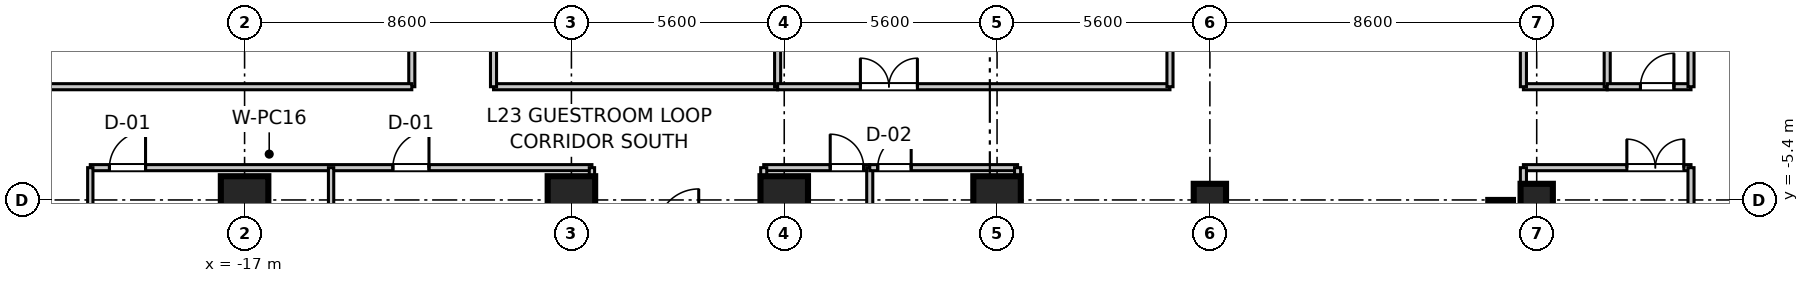
"""IFC4 building model, lengths in metres.
Left out: names, types, materials, properties, quantities, classifications, styles, units other than length and angle.
Written with IfcOpenShell. Run it as: python <this file> out.ifc"""

import sys

from ifc_helpers import new_model, si_unit, direction, frame, frame_2d, origin, origin_2d, place, context, subcontext, project, spatial, rectangle, extrude, source, transform, mapped, element, fill, save


model = new_model("IFC4")
c1 = context("Model", 3, precision=1e-05, world=origin(), true_north=direction((0.0, 1.0)))
c2 = subcontext(c1, "Body", "Model", "MODEL_VIEW")
j1 = project(units=[si_unit("LENGTHUNIT", "METRE"), si_unit("PLANEANGLEUNIT", "RADIAN")], contexts=[c1])
p1 = place(None, origin())
s1 = spatial("IfcSite", under=j1, at=p1, CompositionType="ELEMENT")
p2 = place(p1, origin())
s2 = spatial("IfcBuilding", under=s1, at=p2, CompositionType="ELEMENT")
p3 = place(p2, frame((0.0, 0.0, 95.6)))
s3 = spatial("IfcBuildingStorey", under=s2, at=p3, CompositionType="ELEMENT", Elevation=95.6)
m1 = source(origin(), c2, "Body", "SweptSolid", [
    extrude(rectangle(XDim=1.25, YDim=1.25, at=origin_2d()), origin(), (0.0, 0.0, 1.0), 3.605),
])
for number, where, z_axis, x_axis in (
    (1, (-17.0, -5.4, 0.0), (0.0, 0.0, 1.0), (1.0, 0.0, 0.0)),
    (2, (-8.4, -5.4, 0.0), (0.0, 0.0, 1.0), (1.0, 0.0, 0.0)),
    (3, (-2.8, -5.4, 0.0), (0.0, 0.0, 1.0), (1.0, 0.0, 0.0)),
    (4, (2.8, -5.4, 0.0), (0.0, 0.0, 1.0), (1.0, 0.0, 0.0)),
):
    element("IfcColumn", number, at=place(p3, frame(where, z_axis=z_axis, x_axis=x_axis)), inside=s3, PredefinedType="COLUMN", context=c2, shape_type="MappedRepresentation", body=[
        mapped(m1, transform((0.0, 0.0, 0.0), scale=1.0)),
    ])
m2 = source(origin(), c2, "Body", "SweptSolid", [
    extrude(rectangle(XDim=0.85, YDim=0.85, at=origin_2d()), origin(), (0.0, 0.0, 1.0), 3.605),
])
for number, where, z_axis, x_axis in (
    (5, (8.4, -5.4, 0.0), (0.0, 0.0, 1.0), (1.0, 0.0, 0.0)),
    (6, (17.0, -5.4, 0.0), (0.0, 0.0, 1.0), (1.0, 0.0, 0.0)),
):
    element("IfcColumn", number, at=place(p3, frame(where, z_axis=z_axis, x_axis=x_axis)), inside=s3, PredefinedType="PILASTER", context=c2, shape_type="MappedRepresentation", body=[
        mapped(m2, transform((0.0, 0.0, 0.0), scale=1.0)),
    ])
m3 = source(origin(), c2, "Body", "SweptSolid", [
    extrude(rectangle(XDim=11.6, YDim=0.65, at=frame_2d((5.8, 0.0))), origin(), (0.0, 0.0, 1.0), 3.38),
])
p4 = place(p3, frame((16.05, -17.0, 0.0), z_axis=(0.0, 0.0, 1.0), x_axis=(0.0, 1.0, 0.0)))
e7 = element("IfcWall", 7, at=p4, inside=s3, PredefinedType="SHEAR", context=c2, shape_type="MappedRepresentation", body=[
    mapped(m3, transform((0.0, 0.0, 0.0), scale=1.0)),
])
m4 = source(origin(), c2, "Body", "SweptSolid", [
    extrude(rectangle(XDim=4.41, YDim=0.16, at=frame_2d((2.205, 0.0))), origin(), (0.0, 0.0, 1.0), 2.72),
])
p5 = place(p3, frame((16.65, -4.55, 0.0), z_axis=(0.0, 0.0, 1.0), x_axis=(1.0, 0.0, 0.0)))
e8 = element("IfcWall", 8, at=p5, inside=s3, PredefinedType="PARTITIONING", context=c2, shape_type="MappedRepresentation", body=[
    mapped(m4, transform((0.0, 0.0, 0.0), scale=1.0)),
])
p6 = place(p5, frame((2.722, 0.0, 0.0)))
e9 = element("IfcOpeningElement", 9, at=p6, cuts=e8, PredefinedType="OPENING", context=c2, shape_type="SweptSolid", body=[
    extrude(rectangle(XDim=1.5, YDim=2.15, at=frame_2d((0.75, 1.075))), frame((0.0, 0.09, 0.0), z_axis=(0.0, -1.0, 0.0), x_axis=(1.0, 0.0, 0.0)), (0.0, 0.0, 1.0), 0.18),
])
m5 = source(origin(), c2, "Body", "SweptSolid", [
    extrude(rectangle(XDim=19.25, YDim=0.16, at=frame_2d((9.625, 0.0))), origin(), (0.0, 0.0, 1.0), 2.72),
])
p7 = place(p3, frame((16.65, -23.8, 0.0), z_axis=(0.0, 0.0, 1.0), x_axis=(0.0, 1.0, 0.0)))
e10 = element("IfcWall", 10, at=p7, inside=s3, PredefinedType="PARTITIONING", context=c2, shape_type="MappedRepresentation", body=[
    mapped(m5, transform((0.0, 0.0, 0.0), scale=1.0)),
])
m6 = source(origin(), c2, "Body", "SweptSolid", [
    extrude(rectangle(XDim=17.83, YDim=0.16, at=frame_2d((8.915, 0.0))), origin(), (0.0, 0.0, 1.0), 2.72),
])
p8 = place(p3, frame((21.06, -22.38, 0.0), z_axis=(0.0, 0.0, 1.0), x_axis=(0.0, 1.0, 0.0)))
e11 = element("IfcWall", 11, at=p8, inside=s3, PredefinedType="PARTITIONING", context=c2, shape_type="MappedRepresentation", body=[
    mapped(m6, transform((0.0, 0.0, 0.0), scale=1.0)),
])
m7 = source(origin(), c2, "Body", "SweptSolid", [
    extrude(rectangle(XDim=13.2, YDim=0.16, at=frame_2d((6.6, 0.0))), origin(), (0.0, 0.0, 1.0), 2.72),
])
p9 = place(p3, frame((-21.06, -4.55, 0.0), z_axis=(0.0, 0.0, 1.0), x_axis=(1.0, 0.0, 0.0)))
e12 = element("IfcWall", 12, at=p9, inside=s3, PredefinedType="PARTITIONING", context=c2, shape_type="MappedRepresentation", body=[
    mapped(m7, transform((0.0, 0.0, 0.0), scale=1.0)),
])
p10 = place(p9, frame((0.504, 0.0, 0.0)))
e13 = element("IfcOpeningElement", 13, at=p10, cuts=e12, PredefinedType="OPENING", context=c2, shape_type="SweptSolid", body=[
    extrude(rectangle(XDim=0.95, YDim=2.1, at=frame_2d((0.475, 1.05))), frame((0.0, 0.09, 0.0), z_axis=(0.0, -1.0, 0.0), x_axis=(1.0, 0.0, 0.0)), (0.0, 0.0, 1.0), 0.18),
])
p11 = place(p9, frame((7.962, 0.0, 0.0)))
e14 = element("IfcOpeningElement", 14, at=p11, cuts=e12, PredefinedType="OPENING", context=c2, shape_type="SweptSolid", body=[
    extrude(rectangle(XDim=0.95, YDim=2.1, at=frame_2d((0.475, 1.05))), frame((0.0, 0.09, 0.0), z_axis=(0.0, -1.0, 0.0), x_axis=(1.0, 0.0, 0.0)), (0.0, 0.0, 1.0), 0.18),
])
m8 = source(origin(), c2, "Body", "SweptSolid", [
    extrude(rectangle(XDim=17.83, YDim=0.14, at=frame_2d((8.915, 0.0))), origin(), (0.0, 0.0, 1.0), 2.72),
])
p12 = place(p3, frame((-21.06, -22.38, 0.0), z_axis=(0.0, 0.0, 1.0), x_axis=(0.0, 1.0, 0.0)))
e15 = element("IfcWall", 15, at=p12, inside=s3, PredefinedType="PARTITIONING", context=c2, shape_type="MappedRepresentation", body=[
    mapped(m8, transform((0.0, 0.0, 0.0), scale=1.0)),
])
m9 = source(origin(), c2, "Body", "SweptSolid", [
    extrude(rectangle(XDim=19.25, YDim=0.14, at=frame_2d((9.625, 0.0))), origin(), (0.0, 0.0, 1.0), 2.72),
])
for number, where, z_axis, x_axis in (
    (16, (-7.86, -23.8, 0.0), (0.0, 0.0, 1.0), (0.0, 1.0, 0.0)),
    (17, (-14.724, -23.8, 0.0), (0.0, 0.0, 1.0), (0.0, 1.0, 0.0)),
):
    element("IfcWall", number, at=place(p3, frame(where, z_axis=z_axis, x_axis=x_axis)), inside=s3, PredefinedType="PARTITIONING", context=c2, shape_type="MappedRepresentation", body=[
        mapped(m9, transform((0.0, 0.0, 0.0), scale=1.0)),
    ])
m10 = source(origin(), c2, "Body", "SweptSolid", [
    extrude(rectangle(XDim=2.79, YDim=0.16, at=frame_2d((1.395, 0.0))), origin(), (0.0, 0.0, 1.0), 2.72),
])
p13 = place(p3, frame((-3.34, -4.55, 0.0), z_axis=(0.0, 0.0, 1.0), x_axis=(1.0, 0.0, 0.0)))
e18 = element("IfcWall", 18, at=p13, inside=s3, PredefinedType="PARTITIONING", context=c2, shape_type="MappedRepresentation", body=[
    mapped(m10, transform((0.0, 0.0, 0.0), scale=1.0)),
])
p14 = place(p13, frame((1.75, 0.0, 0.0)))
e19 = element("IfcOpeningElement", 19, at=p14, cuts=e18, PredefinedType="OPENING", context=c2, shape_type="SweptSolid", body=[
    extrude(rectangle(XDim=0.88, YDim=2.1, at=frame_2d((0.44, 1.05))), frame((0.0, 0.09, 0.0), z_axis=(0.0, -1.0, 0.0), x_axis=(1.0, 0.0, 0.0)), (0.0, 0.0, 1.0), 0.18),
])
for number, where, z_axis, x_axis in (
    (20, (-3.34, -23.8, 0.0), (0.0, 0.0, 1.0), (0.0, 1.0, 0.0)),
    (21, (-0.55, -23.8, 0.0), (0.0, 0.0, 1.0), (0.0, 1.0, 0.0)),
):
    element("IfcWall", number, at=place(p3, frame(where, z_axis=z_axis, x_axis=x_axis)), inside=s3, PredefinedType="PARTITIONING", context=c2, shape_type="MappedRepresentation", body=[
        mapped(m5, transform((0.0, 0.0, 0.0), scale=1.0)),
    ])
m11 = source(origin(), c2, "Body", "SweptSolid", [
    extrude(rectangle(XDim=3.89, YDim=0.16, at=frame_2d((1.945, 0.0))), origin(), (0.0, 0.0, 1.0), 2.72),
])
p15 = place(p3, frame((-0.55, -4.55, 0.0), z_axis=(0.0, 0.0, 1.0), x_axis=(1.0, 0.0, 0.0)))
e22 = element("IfcWall", 22, at=p15, inside=s3, PredefinedType="PARTITIONING", context=c2, shape_type="MappedRepresentation", body=[
    mapped(m11, transform((0.0, 0.0, 0.0), scale=1.0)),
])
p16 = place(p15, frame((0.21, 0.0, 0.0)))
e23 = element("IfcOpeningElement", 23, at=p16, cuts=e22, PredefinedType="OPENING", context=c2, shape_type="SweptSolid", body=[
    extrude(rectangle(XDim=0.88, YDim=2.1, at=frame_2d((0.44, 1.05))), frame((0.0, 0.09, 0.0), z_axis=(0.0, -1.0, 0.0), x_axis=(1.0, 0.0, 0.0)), (0.0, 0.0, 1.0), 0.18),
])
p17 = place(p3, frame((3.34, -23.8, 0.0), z_axis=(0.0, 0.0, 1.0), x_axis=(0.0, 1.0, 0.0)))
e24 = element("IfcWall", 24, at=p17, inside=s3, PredefinedType="PARTITIONING", context=c2, shape_type="MappedRepresentation", body=[
    mapped(m5, transform((0.0, 0.0, 0.0), scale=1.0)),
])
m12 = source(origin(), c2, "Body", "SweptSolid", [
    extrude(rectangle(XDim=4.84, YDim=0.16, at=frame_2d((2.42, 0.0))), origin(), (0.0, 0.0, 1.0), 2.72),
])
p18 = place(p3, frame((-12.6, -2.42, 0.0), z_axis=(0.0, 0.0, 1.0), x_axis=(0.0, 1.0, 0.0)))
e25 = element("IfcWall", 25, at=p18, inside=s3, PredefinedType="PARTITIONING", context=c2, shape_type="MappedRepresentation", body=[
    mapped(m12, transform((0.0, 0.0, 0.0), scale=1.0)),
])
m13 = source(origin(), c2, "Body", "SweptSolid", [
    extrude(rectangle(XDim=11.2, YDim=0.16, at=frame_2d((5.6, 0.0))), origin(), (0.0, 0.0, 1.0), 2.72),
])
p19 = place(p3, frame((-23.8, -2.42, 0.0), z_axis=(0.0, 0.0, 1.0), x_axis=(1.0, 0.0, 0.0)))
e26 = element("IfcWall", 26, at=p19, inside=s3, PredefinedType="PARTITIONING", context=c2, shape_type="MappedRepresentation", body=[
    mapped(m13, transform((0.0, 0.0, 0.0), scale=1.0)),
])
m14 = source(origin(), c2, "Body", "SweptSolid", [
    extrude(rectangle(XDim=7.476, YDim=0.16, at=frame_2d((3.738, 0.0))), origin(), (0.0, 0.0, 1.0), 2.72),
])
p20 = place(p3, frame((-10.45, -2.42, 0.0), z_axis=(0.0, 0.0, 1.0), x_axis=(1.0, 0.0, 0.0)))
e27 = element("IfcWall", 27, at=p20, inside=s3, PredefinedType="PARTITIONING", context=c2, shape_type="MappedRepresentation", body=[
    mapped(m14, transform((0.0, 0.0, 0.0), scale=1.0)),
])
for number, where, z_axis, x_axis in (
    (28, (-10.45, -2.42, 0.0), (0.0, 0.0, 1.0), (0.0, 1.0, 0.0)),
    (29, (-2.974, -2.42, 0.0), (0.0, 0.0, 1.0), (0.0, 1.0, 0.0)),
):
    element("IfcWall", number, at=place(p3, frame(where, z_axis=z_axis, x_axis=x_axis)), inside=s3, PredefinedType="PARTITIONING", context=c2, shape_type="MappedRepresentation", body=[
        mapped(m12, transform((0.0, 0.0, 0.0), scale=1.0)),
    ])
m15 = source(origin(), c2, "Body", "SweptSolid", [
    extrude(rectangle(XDim=10.324, YDim=0.16, at=frame_2d((5.162, 0.0))), origin(), (0.0, 0.0, 1.0), 2.72),
])
p21 = place(p3, frame((-2.974, -2.42, 0.0), z_axis=(0.0, 0.0, 1.0), x_axis=(1.0, 0.0, 0.0)))
e30 = element("IfcWall", 30, at=p21, inside=s3, PredefinedType="PARTITIONING", context=c2, shape_type="MappedRepresentation", body=[
    mapped(m15, transform((0.0, 0.0, 0.0), scale=1.0)),
])
p22 = place(p21, frame((2.178, 0.0, 0.0)))
e31 = element("IfcOpeningElement", 31, at=p22, cuts=e30, PredefinedType="OPENING", context=c2, shape_type="SweptSolid", body=[
    extrude(rectangle(XDim=1.5, YDim=2.15, at=frame_2d((0.75, 1.075))), frame((0.0, 0.09, 0.0), z_axis=(0.0, -1.0, 0.0), x_axis=(1.0, 0.0, 0.0)), (0.0, 0.0, 1.0), 0.18),
])
p23 = place(p3, frame((7.35, -2.42, 0.0), z_axis=(0.0, 0.0, 1.0), x_axis=(0.0, 1.0, 0.0)))
e32 = element("IfcWall", 32, at=p23, inside=s3, PredefinedType="PARTITIONING", context=c2, shape_type="MappedRepresentation", body=[
    mapped(m12, transform((0.0, 0.0, 0.0), scale=1.0)),
])
m16 = source(origin(), c2, "Body", "SweptSolid", [
    extrude(rectangle(XDim=2.205, YDim=0.16, at=frame_2d((1.103, 0.0))), origin(), (0.0, 0.0, 1.0), 2.72),
])
p24 = place(p3, frame((16.65, -2.42, 0.0), z_axis=(0.0, 0.0, 1.0), x_axis=(1.0, 0.0, 0.0)))
e33 = element("IfcWall", 33, at=p24, inside=s3, PredefinedType="PARTITIONING", context=c2, shape_type="MappedRepresentation", body=[
    mapped(m16, transform((0.0, 0.0, 0.0), scale=1.0)),
])
for number, where, z_axis, x_axis in (
    (34, (16.65, -2.42, 0.0), (0.0, 0.0, 1.0), (0.0, 1.0, 0.0)),
    (35, (18.855, -2.42, 0.0), (0.0, 0.0, 1.0), (0.0, 1.0, 0.0)),
):
    element("IfcWall", number, at=place(p3, frame(where, z_axis=z_axis, x_axis=x_axis)), inside=s3, PredefinedType="PARTITIONING", context=c2, shape_type="MappedRepresentation", body=[
        mapped(m12, transform((0.0, 0.0, 0.0), scale=1.0)),
    ])
p25 = place(p3, frame((18.855, -2.42, 0.0), z_axis=(0.0, 0.0, 1.0), x_axis=(1.0, 0.0, 0.0)))
e36 = element("IfcWall", 36, at=p25, inside=s3, PredefinedType="PARTITIONING", context=c2, shape_type="MappedRepresentation", body=[
    mapped(m16, transform((0.0, 0.0, 0.0), scale=1.0)),
])
p26 = place(p25, frame((0.875, 0.0, 0.0)))
e37 = element("IfcOpeningElement", 37, at=p26, cuts=e36, PredefinedType="OPENING", context=c2, shape_type="SweptSolid", body=[
    extrude(rectangle(XDim=0.88, YDim=2.1, at=frame_2d((0.44, 1.05))), frame((0.0, 0.09, 0.0), z_axis=(0.0, -1.0, 0.0), x_axis=(1.0, 0.0, 0.0)), (0.0, 0.0, 1.0), 0.18),
])
p27 = place(p3, frame((21.06, -2.42, 0.0), z_axis=(0.0, 0.0, 1.0), x_axis=(0.0, 1.0, 0.0)))
e38 = element("IfcWall", 38, at=p27, inside=s3, PredefinedType="PARTITIONING", context=c2, shape_type="MappedRepresentation", body=[
    mapped(m12, transform((0.0, 0.0, 0.0), scale=1.0)),
])
m17 = source(origin(), c2, "Body", "SweptSolid", [
    extrude(rectangle(XDim=1.5, YDim=2.15, at=frame_2d((0.75, 1.075))), frame((0.0, 0.025, 0.0), z_axis=(0.0, -1.0, 0.0), x_axis=(1.0, 0.0, 0.0)), (0.0, 0.0, 1.0), 0.05),
])
p28 = place(p6, frame((1.5, 0.0, 0.0), z_axis=(0.0, 0.0, 1.0), x_axis=(-1.0, 0.0, 0.0)))
e39 = element("IfcDoor", 39, at=p28, inside=s3, OperationType="DOUBLE_DOOR_SINGLE_SWING", PredefinedType="DOOR", context=c2, shape_type="MappedRepresentation", body=[
    mapped(m17, transform((0.0, 0.0, 0.0), scale=1.0)),
])
fill(e9, e39)
m18 = source(origin(), c2, "Body", "SweptSolid", [
    extrude(rectangle(XDim=0.95, YDim=2.1, at=frame_2d((0.475, 1.05))), frame((0.0, 0.025, 0.0), z_axis=(0.0, -1.0, 0.0), x_axis=(1.0, 0.0, 0.0)), (0.0, 0.0, 1.0), 0.05),
])
p29 = place(p10, frame((0.95, 0.0, 0.0), z_axis=(0.0, 0.0, 1.0), x_axis=(-1.0, 0.0, 0.0)))
e40 = element("IfcDoor", 40, at=p29, inside=s3, OperationType="SINGLE_SWING_RIGHT", PredefinedType="DOOR", context=c2, shape_type="MappedRepresentation", body=[
    mapped(m18, transform((0.0, 0.0, 0.0), scale=1.0)),
])
fill(e13, e40)
p30 = place(p11, frame((0.95, 0.0, 0.0), z_axis=(0.0, 0.0, 1.0), x_axis=(-1.0, 0.0, 0.0)))
e41 = element("IfcDoor", 41, at=p30, inside=s3, OperationType="SINGLE_SWING_RIGHT", PredefinedType="DOOR", context=c2, shape_type="MappedRepresentation", body=[
    mapped(m18, transform((0.0, 0.0, 0.0), scale=1.0)),
])
fill(e14, e41)
m19 = source(origin(), c2, "Body", "SweptSolid", [
    extrude(rectangle(XDim=0.88, YDim=2.1, at=frame_2d((0.44, 1.05))), frame((0.0, 0.025, 0.0), z_axis=(0.0, -1.0, 0.0), x_axis=(1.0, 0.0, 0.0)), (0.0, 0.0, 1.0), 0.05),
])
p31 = place(p14, frame((0.88, 0.0, 0.0), z_axis=(0.0, 0.0, 1.0), x_axis=(-1.0, 0.0, 0.0)))
e42 = element("IfcDoor", 42, at=p31, inside=s3, OperationType="SINGLE_SWING_LEFT", PredefinedType="DOOR", context=c2, shape_type="MappedRepresentation", body=[
    mapped(m19, transform((0.0, 0.0, 0.0), scale=1.0)),
])
fill(e19, e42)
p32 = place(p16, frame((0.88, 0.0, 0.0), z_axis=(0.0, 0.0, 1.0), x_axis=(-1.0, 0.0, 0.0)))
e43 = element("IfcDoor", 43, at=p32, inside=s3, OperationType="SINGLE_SWING_RIGHT", PredefinedType="DOOR", context=c2, shape_type="MappedRepresentation", body=[
    mapped(m19, transform((0.0, 0.0, 0.0), scale=1.0)),
])
fill(e23, e43)
p33 = place(p22, origin())
e44 = element("IfcDoor", 44, at=p33, inside=s3, OperationType="DOUBLE_DOOR_SINGLE_SWING", PredefinedType="DOOR", context=c2, shape_type="MappedRepresentation", body=[
    mapped(m17, transform((0.0, 0.0, 0.0), scale=1.0)),
])
fill(e31, e44)
p34 = place(p26, origin())
e45 = element("IfcDoor", 45, at=p34, inside=s3, OperationType="SINGLE_SWING_RIGHT", PredefinedType="DOOR", context=c2, shape_type="MappedRepresentation", body=[
    mapped(m19, transform((0.0, 0.0, 0.0), scale=1.0)),
])
fill(e37, e45)
save(model, sys.argv[1])
